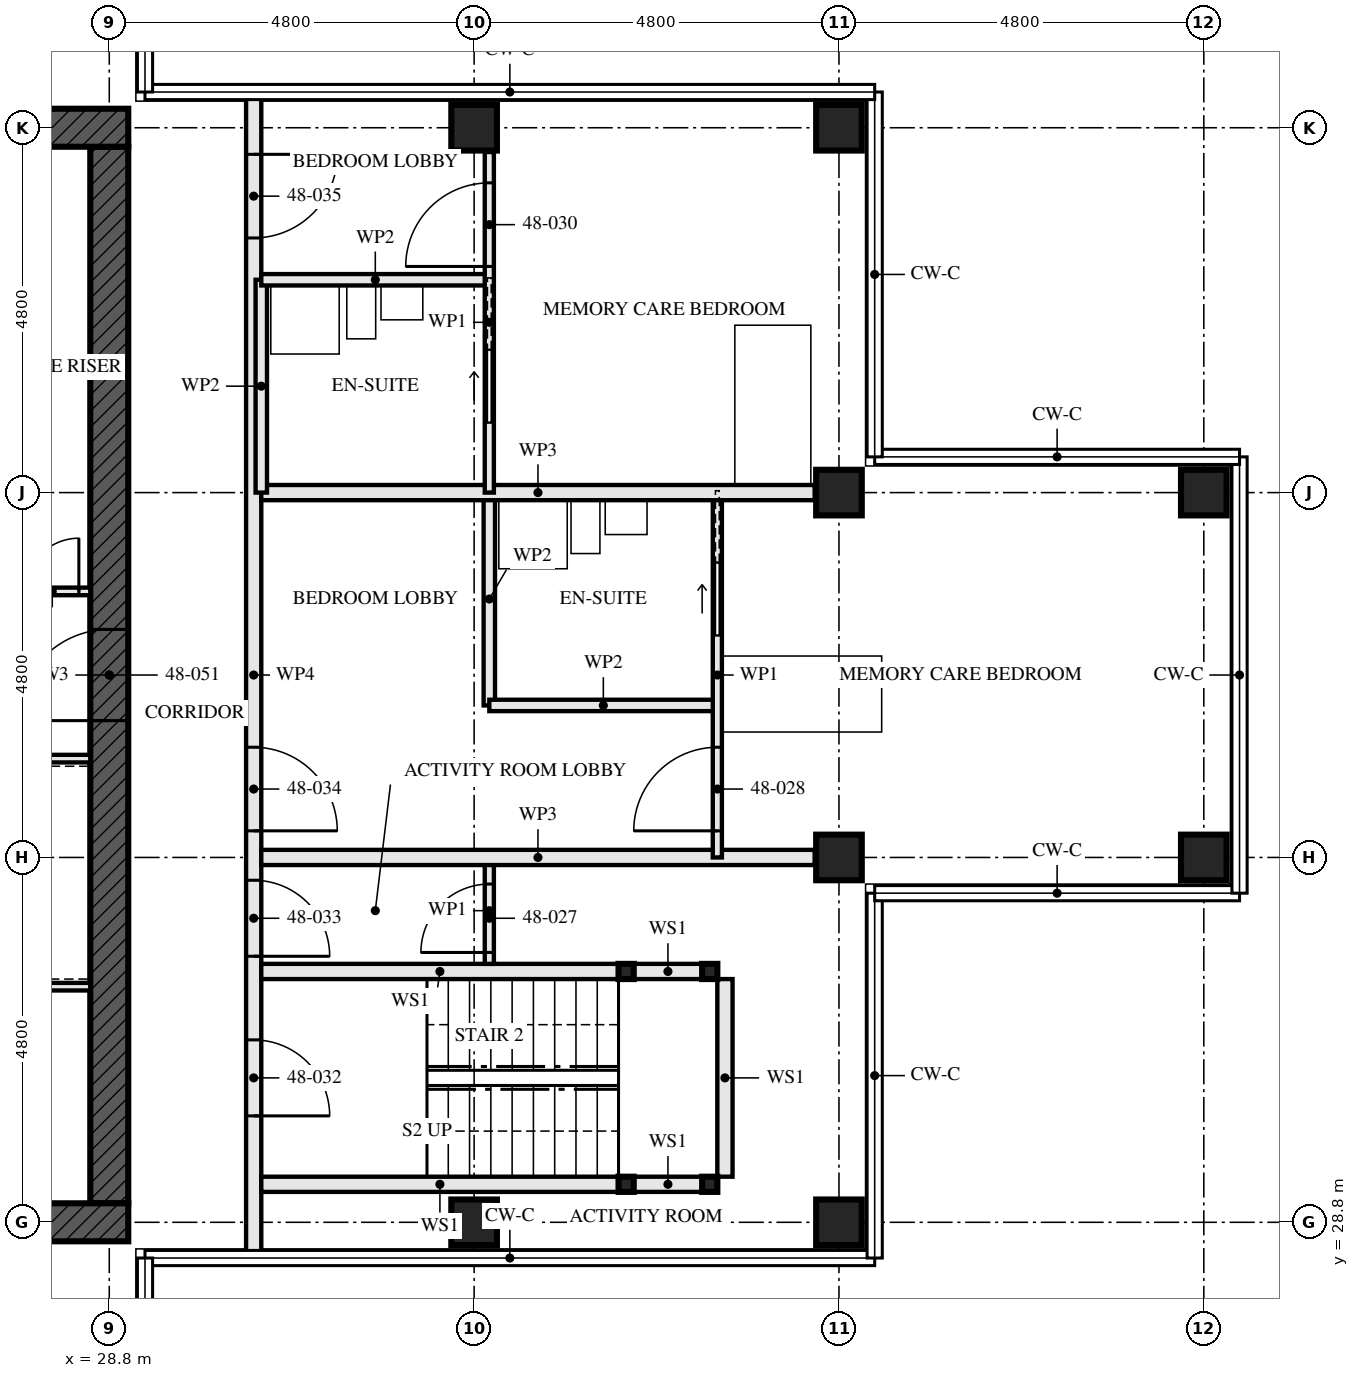
"""IFC4 building model, lengths in metres.
Left out: names, types, materials, properties, quantities, classifications, styles, units other than length and angle.
Written with IfcOpenShell. Run it as: python <this file> out.ifc"""

import sys

from ifc_helpers import new_model, si_unit, direction, frame, frame_2d, origin, origin_2d, place, context, subcontext, project, spatial, rectangle, hollow_rectangle, extrude, element, fill, save


model = new_model("IFC4")
c1 = context("Model", 3, precision=1e-05, world=origin(), true_north=direction((0.0, 1.0)))
c2 = subcontext(c1, "Body", "Model", "MODEL_VIEW")
j1 = project(units=[si_unit("LENGTHUNIT", "METRE"), si_unit("PLANEANGLEUNIT", "RADIAN")], contexts=[c1])
p1 = place(None, origin())
s1 = spatial("IfcSite", under=j1, at=p1, CompositionType="ELEMENT")
p2 = place(p1, origin())
s2 = spatial("IfcBuilding", under=s1, at=p2, CompositionType="ELEMENT")
p3 = place(p2, frame((0.0, 0.0, 176.0)))
s3 = spatial("IfcBuildingStorey", under=s2, at=p3, CompositionType="ELEMENT", Elevation=176.0)
for number, where, z_axis, x_axis in (
    (1, (33.6, 28.8, 0.0), (0.0, 0.0, 1.0), (0.0, 1.0, 0.0)),
    (2, (33.6, 43.2, 0.0), (0.0, 0.0, 1.0), (0.0, 1.0, 0.0)),
    (3, (38.4, 28.8, 0.0), (0.0, 0.0, 1.0), (0.0, 1.0, 0.0)),
    (4, (38.4, 33.6, 0.0), (0.0, 0.0, 1.0), (0.0, 1.0, 0.0)),
    (5, (38.4, 38.4, 0.0), (0.0, 0.0, 1.0), (0.0, 1.0, 0.0)),
    (6, (38.4, 43.2, 0.0), (0.0, 0.0, 1.0), (0.0, 1.0, 0.0)),
    (7, (43.2, 33.6, 0.0), (0.0, 0.0, 1.0), (0.0, 1.0, 0.0)),
    (8, (43.2, 38.4, 0.0), (0.0, 0.0, 1.0), (0.0, 1.0, 0.0)),
):
    element("IfcColumn", number, at=place(p3, frame(where, z_axis=z_axis, x_axis=x_axis)), inside=s3, PredefinedType="COLUMN", context=c2, shape_type="SweptSolid", body=[
        extrude(hollow_rectangle(XDim=0.6, YDim=0.6, WallThickness=0.08, at=origin_2d()), origin(), (0.0, 0.0, 1.0), 3.5),
    ])
p4 = place(p3, frame((14.15, 28.8, -0.17), z_axis=(0.0, 0.0, 1.0), x_axis=(1.0, 0.0, 0.0)))
e9 = element("IfcWall", 9, at=p4, inside=s3, PredefinedType="SHEAR", context=c2, shape_type="SweptSolid", body=[
    extrude(rectangle(XDim=14.9, YDim=0.5, at=frame_2d((7.45, 0.0))), origin(), (0.0, 0.0, 1.0), 3.5),
])
p5 = place(p4, frame((6.85, 0.0, 0.17)))
e10 = element("IfcOpeningElement", 10, at=p5, cuts=e9, PredefinedType="OPENING", context=c2, shape_type="SweptSolid", body=[
    extrude(rectangle(XDim=1.2, YDim=2.1, at=frame_2d((0.6, 1.05))), frame((0.0, 0.26, 0.0), z_axis=(0.0, -1.0, 0.0), x_axis=(1.0, 0.0, 0.0)), (0.0, 0.0, 1.0), 0.521),
])
p6 = place(p3, frame((29.05, 43.2, -0.17), z_axis=(0.0, 0.0, 1.0), x_axis=(-1.0, 0.0, 0.0)))
e11 = element("IfcWall", 11, at=p6, inside=s3, PredefinedType="SHEAR", context=c2, shape_type="SweptSolid", body=[
    extrude(rectangle(XDim=14.9, YDim=0.5, at=frame_2d((7.45, 0.0))), origin(), (0.0, 0.0, 1.0), 3.5),
])
p7 = place(p6, frame((6.85, 0.0, 0.17)))
e12 = element("IfcOpeningElement", 12, at=p7, cuts=e11, PredefinedType="OPENING", context=c2, shape_type="SweptSolid", body=[
    extrude(rectangle(XDim=1.2, YDim=2.1, at=frame_2d((0.6, 1.05))), frame((0.0, 0.26, 0.0), z_axis=(0.0, -1.0, 0.0), x_axis=(1.0, 0.0, 0.0)), (0.0, 0.0, 1.0), 0.521),
])
p8 = place(p3, frame((28.8, 29.05, -0.17), z_axis=(0.0, 0.0, 1.0), x_axis=(0.0, 1.0, 0.0)))
e13 = element("IfcWall", 13, at=p8, inside=s3, PredefinedType="SHEAR", context=c2, shape_type="SweptSolid", body=[
    extrude(rectangle(XDim=13.9, YDim=0.5, at=frame_2d((6.95, 0.0))), origin(), (0.0, 0.0, 1.0), 3.5),
])
p9 = place(p8, frame((6.35, 0.0, 0.17)))
e14 = element("IfcOpeningElement", 14, at=p9, cuts=e13, PredefinedType="OPENING", context=c2, shape_type="SweptSolid", body=[
    extrude(rectangle(XDim=1.2, YDim=2.1, at=frame_2d((0.6, 1.05))), frame((0.0, 0.26, 0.0), z_axis=(0.0, -1.0, 0.0), x_axis=(1.0, 0.0, 0.0)), (0.0, 0.0, 1.0), 0.521),
])
for number, where, z_axis, x_axis in (
    (15, (36.7, 29.3, 0.0), (0.0, 0.0, 1.0), (1.0, 0.0, 0.0)),
    (16, (36.7, 32.1, 0.0), (0.0, 0.0, 1.0), (1.0, 0.0, 0.0)),
    (17, (35.6, 29.3, 0.0), (0.0, 0.0, 1.0), (1.0, 0.0, 0.0)),
    (18, (35.6, 32.1, 0.0), (0.0, 0.0, 1.0), (1.0, 0.0, 0.0)),
):
    element("IfcColumn", number, at=place(p3, frame(where, z_axis=z_axis, x_axis=x_axis)), inside=s3, PredefinedType="COLUMN", context=c2, shape_type="SweptSolid", body=[
        extrude(hollow_rectangle(XDim=0.2, YDim=0.2, WallThickness=0.008, at=origin_2d()), origin(), (0.0, 0.0, 1.0), 3.33),
    ])
p10 = place(p3, frame((36.6, 29.3, 0.0), z_axis=(0.0, 0.0, 1.0), x_axis=(-1.0, 0.0, 0.0)))
e19 = element("IfcWall", 19, at=p10, inside=s3, PredefinedType="SOLIDWALL", context=c2, shape_type="SweptSolid", body=[
    extrude(rectangle(XDim=0.9, YDim=0.2, at=frame_2d((0.45, 0.0))), origin(), (0.0, 0.0, 1.0), 2.99),
])
p11 = place(p3, frame((35.5, 29.3, 0.0), z_axis=(0.0, 0.0, 1.0), x_axis=(-1.0, 0.0, 0.0)))
e20 = element("IfcWall", 20, at=p11, inside=s3, PredefinedType="SOLIDWALL", context=c2, shape_type="SweptSolid", body=[
    extrude(rectangle(XDim=4.7, YDim=0.2, at=frame_2d((2.35, 0.0))), origin(), (0.0, 0.0, 1.0), 2.99),
])
p12 = place(p3, frame((36.6, 32.1, 0.0), z_axis=(0.0, 0.0, 1.0), x_axis=(-1.0, 0.0, 0.0)))
e21 = element("IfcWall", 21, at=p12, inside=s3, PredefinedType="SOLIDWALL", context=c2, shape_type="SweptSolid", body=[
    extrude(rectangle(XDim=0.9, YDim=0.2, at=frame_2d((0.45, 0.0))), origin(), (0.0, 0.0, 1.0), 2.99),
])
p13 = place(p3, frame((35.5, 32.1, 0.0), z_axis=(0.0, 0.0, 1.0), x_axis=(-1.0, 0.0, 0.0)))
e22 = element("IfcWall", 22, at=p13, inside=s3, PredefinedType="SOLIDWALL", context=c2, shape_type="SweptSolid", body=[
    extrude(rectangle(XDim=4.7, YDim=0.2, at=frame_2d((2.35, 0.0))), origin(), (0.0, 0.0, 1.0), 2.99),
])
p14 = place(p3, frame((36.9, 29.4, 0.0), z_axis=(0.0, 0.0, 1.0), x_axis=(0.0, 1.0, 0.0)))
e23 = element("IfcWall", 23, at=p14, inside=s3, PredefinedType="SOLIDWALL", context=c2, shape_type="SweptSolid", body=[
    extrude(rectangle(XDim=2.6, YDim=0.2, at=frame_2d((1.3, 0.0))), origin(), (0.0, 0.0, 1.0), 3.33),
])
p15 = place(p3, frame((33.8, 32.2, 0.0), z_axis=(0.0, 0.0, 1.0), x_axis=(0.0, 1.0, 0.0)))
e24 = element("IfcWall", 24, at=p15, inside=s3, PredefinedType="PARTITIONING", context=c2, shape_type="SweptSolid", body=[
    extrude(rectangle(XDim=1.4, YDim=0.12, at=frame_2d((0.7, 0.0))), origin(), (0.0, 0.0, 1.0), 3.33),
])
p16 = place(p15, frame((0.15, 0.0, 0.0)))
e25 = element("IfcOpeningElement", 25, at=p16, cuts=e24, PredefinedType="OPENING", context=c2, shape_type="SweptSolid", body=[
    extrude(rectangle(XDim=0.9, YDim=2.1, at=frame_2d((0.45, 1.05))), frame((0.0, 0.071, 0.0), z_axis=(0.0, -1.0, 0.0), x_axis=(1.0, 0.0, 0.0)), (0.0, 0.0, 1.0), 0.141),
])
p17 = place(p3, frame((38.08, 33.6, 0.0), z_axis=(0.0, 0.0, 1.0), x_axis=(-1.0, 0.0, 0.0)))
e26 = element("IfcWall", 26, at=p17, inside=s3, PredefinedType="PARTITIONING", context=c2, shape_type="SweptSolid", body=[
    extrude(rectangle(XDim=7.28, YDim=0.2, at=frame_2d((3.64, 0.0))), origin(), (0.0, 0.0, 1.0), 2.55),
])
p18 = place(p3, frame((36.8, 35.6, 0.0), z_axis=(0.0, 0.0, 1.0), x_axis=(-1.0, 0.0, 0.0)))
e27 = element("IfcWall", 27, at=p18, inside=s3, PredefinedType="PARTITIONING", context=c2, shape_type="SweptSolid", body=[
    extrude(rectangle(XDim=3.0, YDim=0.15, at=frame_2d((1.5, 0.0))), origin(), (0.0, 0.0, 1.0), 3.33),
])
p19 = place(p3, frame((33.8, 35.6, 0.0), z_axis=(0.0, 0.0, 1.0), x_axis=(0.0, 1.0, 0.0)))
e28 = element("IfcWall", 28, at=p19, inside=s3, PredefinedType="PARTITIONING", context=c2, shape_type="SweptSolid", body=[
    extrude(rectangle(XDim=2.8, YDim=0.15, at=frame_2d((1.4, 0.0))), origin(), (0.0, 0.0, 1.0), 3.33),
])
p20 = place(p3, frame((36.8, 33.6, 0.0), z_axis=(0.0, 0.0, 1.0), x_axis=(0.0, 1.0, 0.0)))
e29 = element("IfcWall", 29, at=p20, inside=s3, PredefinedType="PARTITIONING", context=c2, shape_type="SweptSolid", body=[
    extrude(rectangle(XDim=4.8, YDim=0.12, at=frame_2d((2.4, 0.0))), origin(), (0.0, 0.0, 1.0), 3.33),
])
p21 = place(p20, frame((0.35, 0.0, 0.0)))
e30 = element("IfcOpeningElement", 30, at=p21, cuts=e29, PredefinedType="OPENING", context=c2, shape_type="SweptSolid", body=[
    extrude(rectangle(XDim=1.1, YDim=2.1, at=frame_2d((0.55, 1.05))), frame((0.0, 0.071, 0.0), z_axis=(0.0, -1.0, 0.0), x_axis=(1.0, 0.0, 0.0)), (0.0, 0.0, 1.0), 0.141),
])
p22 = place(p20, frame((2.925, 0.0, 0.0)))
e31 = element("IfcOpeningElement", 31, at=p22, cuts=e29, PredefinedType="OPENING", context=c2, shape_type="SweptSolid", body=[
    extrude(rectangle(XDim=0.95, YDim=2.1, at=frame_2d((0.475, 1.05))), frame((0.0, 0.071, 0.0), z_axis=(0.0, -1.0, 0.0), x_axis=(1.0, 0.0, 0.0)), (0.0, 0.0, 1.0), 0.141),
])
p23 = place(p3, frame((38.08, 38.4, 0.0), z_axis=(0.0, 0.0, 1.0), x_axis=(-1.0, 0.0, 0.0)))
e32 = element("IfcWall", 32, at=p23, inside=s3, PredefinedType="PARTITIONING", context=c2, shape_type="SweptSolid", body=[
    extrude(rectangle(XDim=7.28, YDim=0.2, at=frame_2d((3.64, 0.0))), origin(), (0.0, 0.0, 1.0), 2.55),
])
p24 = place(p3, frame((33.8, 41.2, 0.0), z_axis=(0.0, 0.0, 1.0), x_axis=(-1.0, 0.0, 0.0)))
e33 = element("IfcWall", 33, at=p24, inside=s3, PredefinedType="PARTITIONING", context=c2, shape_type="SweptSolid", body=[
    extrude(rectangle(XDim=3.0, YDim=0.15, at=frame_2d((1.5, 0.0))), origin(), (0.0, 0.0, 1.0), 3.33),
])
p25 = place(p3, frame((30.8, 38.4, 0.0), z_axis=(0.0, 0.0, 1.0), x_axis=(0.0, 1.0, 0.0)))
e34 = element("IfcWall", 34, at=p25, inside=s3, PredefinedType="PARTITIONING", context=c2, shape_type="SweptSolid", body=[
    extrude(rectangle(XDim=2.8, YDim=0.15, at=frame_2d((1.4, 0.0))), origin(), (0.0, 0.0, 1.0), 3.33),
])
p26 = place(p3, frame((33.8, 38.4, 0.0), z_axis=(0.0, 0.0, 1.0), x_axis=(0.0, 1.0, 0.0)))
e35 = element("IfcWall", 35, at=p26, inside=s3, PredefinedType="PARTITIONING", context=c2, shape_type="SweptSolid", body=[
    extrude(rectangle(XDim=4.48, YDim=0.12, at=frame_2d((2.24, 0.0))), origin(), (0.0, 0.0, 1.0), 3.33),
])
p27 = place(p26, frame((2.975, 0.0, 0.0)))
e36 = element("IfcOpeningElement", 36, at=p27, cuts=e35, PredefinedType="OPENING", context=c2, shape_type="SweptSolid", body=[
    extrude(rectangle(XDim=1.1, YDim=2.1, at=frame_2d((0.55, 1.05))), frame((0.0, 0.071, 0.0), z_axis=(0.0, -1.0, 0.0), x_axis=(1.0, 0.0, 0.0)), (0.0, 0.0, 1.0), 0.141),
])
p28 = place(p26, frame((0.925, 0.0, 0.0)))
e37 = element("IfcOpeningElement", 37, at=p28, cuts=e35, PredefinedType="OPENING", context=c2, shape_type="SweptSolid", body=[
    extrude(rectangle(XDim=0.95, YDim=2.1, at=frame_2d((0.475, 1.05))), frame((0.0, 0.071, 0.0), z_axis=(0.0, -1.0, 0.0), x_axis=(1.0, 0.0, 0.0)), (0.0, 0.0, 1.0), 0.141),
])
p29 = place(p3, frame((30.7, 28.35, 0.0), z_axis=(0.0, 0.0, 1.0), x_axis=(0.0, 1.0, 0.0)))
e38 = element("IfcWall", 38, at=p29, inside=s3, PredefinedType="PARTITIONING", context=c2, shape_type="SweptSolid", body=[
    extrude(rectangle(XDim=15.3, YDim=0.2, at=frame_2d((7.65, 0.0))), origin(), (0.0, 0.0, 1.0), 2.32),
])
p30 = place(p29, frame((1.85, 0.0, 0.0)))
e39 = element("IfcOpeningElement", 39, at=p30, cuts=e38, PredefinedType="OPENING", context=c2, shape_type="SweptSolid", body=[
    extrude(rectangle(XDim=1.0, YDim=2.1, at=frame_2d((0.5, 1.05))), frame((0.0, 0.111, 0.0), z_axis=(0.0, -1.0, 0.0), x_axis=(1.0, 0.0, 0.0)), (0.0, 0.0, 1.0), 0.221),
])
p31 = place(p29, frame((3.95, 0.0, 0.0)))
e40 = element("IfcOpeningElement", 40, at=p31, cuts=e38, PredefinedType="OPENING", context=c2, shape_type="SweptSolid", body=[
    extrude(rectangle(XDim=1.0, YDim=2.1, at=frame_2d((0.5, 1.05))), frame((0.0, 0.111, 0.0), z_axis=(0.0, -1.0, 0.0), x_axis=(1.0, 0.0, 0.0)), (0.0, 0.0, 1.0), 0.221),
])
p32 = place(p29, frame((5.6, 0.0, 0.0)))
e41 = element("IfcOpeningElement", 41, at=p32, cuts=e38, PredefinedType="OPENING", context=c2, shape_type="SweptSolid", body=[
    extrude(rectangle(XDim=1.1, YDim=2.1, at=frame_2d((0.55, 1.05))), frame((0.0, 0.111, 0.0), z_axis=(0.0, -1.0, 0.0), x_axis=(1.0, 0.0, 0.0)), (0.0, 0.0, 1.0), 0.221),
])
p33 = place(p29, frame((13.4, 0.0, 0.0)))
e42 = element("IfcOpeningElement", 42, at=p33, cuts=e38, PredefinedType="OPENING", context=c2, shape_type="SweptSolid", body=[
    extrude(rectangle(XDim=1.1, YDim=2.1, at=frame_2d((0.55, 1.05))), frame((0.0, 0.111, 0.0), z_axis=(0.0, -1.0, 0.0), x_axis=(1.0, 0.0, 0.0)), (0.0, 0.0, 1.0), 0.221),
])
p34 = place(p3, frame((23.05, 34.9, 0.0), z_axis=(0.0, 0.0, 1.0), x_axis=(1.0, 0.0, 0.0)))
e43 = element("IfcWall", 43, at=p34, inside=s3, PredefinedType="SOLIDWALL", context=c2, shape_type="SweptSolid", body=[
    extrude(rectangle(XDim=5.5, YDim=0.1, at=frame_2d((2.75, 0.0))), origin(), (0.0, 0.0, 1.0), 3.33),
])
p35 = place(p34, frame((0.85, 0.0, 0.0)))
e44 = element("IfcOpeningElement", 44, at=p35, cuts=e43, PredefinedType="OPENING", context=c2, shape_type="SweptSolid", body=[
    extrude(rectangle(XDim=1.0, YDim=2.1, at=frame_2d((0.5, 1.05))), frame((0.0, 0.061, 0.0), z_axis=(0.0, -1.0, 0.0), x_axis=(1.0, 0.0, 0.0)), (0.0, 0.0, 1.0), 0.121),
])
p36 = place(p34, frame((3.625, 0.0, 0.0)))
e45 = element("IfcOpeningElement", 45, at=p36, cuts=e43, PredefinedType="OPENING", context=c2, shape_type="SweptSolid", body=[
    extrude(rectangle(XDim=1.0, YDim=2.1, at=frame_2d((0.5, 1.05))), frame((0.0, 0.061, 0.0), z_axis=(0.0, -1.0, 0.0), x_axis=(1.0, 0.0, 0.0)), (0.0, 0.0, 1.0), 0.121),
])
p37 = place(p3, frame((22.65, 37.1, 0.0), z_axis=(0.0, 0.0, 1.0), x_axis=(1.0, 0.0, 0.0)))
e46 = element("IfcWall", 46, at=p37, inside=s3, PredefinedType="SOLIDWALL", context=c2, shape_type="SweptSolid", body=[
    extrude(rectangle(XDim=5.9, YDim=0.1, at=frame_2d((2.95, 0.0))), origin(), (0.0, 0.0, 1.0), 3.33),
])
p38 = place(p37, frame((3.5, 0.0, 0.0)))
e47 = element("IfcOpeningElement", 47, at=p38, cuts=e46, PredefinedType="OPENING", context=c2, shape_type="SweptSolid", body=[
    extrude(rectangle(XDim=0.9, YDim=2.1, at=frame_2d((0.45, 1.05))), frame((0.0, 0.061, 0.0), z_axis=(0.0, -1.0, 0.0), x_axis=(1.0, 0.0, 0.0)), (0.0, 0.0, 1.0), 0.121),
])
p39 = place(p37, frame((5.05, 0.0, 0.0)))
e48 = element("IfcOpeningElement", 48, at=p39, cuts=e46, PredefinedType="OPENING", context=c2, shape_type="SweptSolid", body=[
    extrude(rectangle(XDim=0.7, YDim=2.1, at=frame_2d((0.35, 1.05))), frame((0.0, 0.061, 0.0), z_axis=(0.0, -1.0, 0.0), x_axis=(1.0, 0.0, 0.0)), (0.0, 0.0, 1.0), 0.121),
])
p40 = place(p3, frame((23.15, 31.9, 0.0), z_axis=(0.0, 0.0, 1.0), x_axis=(1.0, 0.0, 0.0)))
e49 = element("IfcWall", 49, at=p40, inside=s3, PredefinedType="SOLIDWALL", context=c2, shape_type="SweptSolid", body=[
    extrude(rectangle(XDim=5.4, YDim=0.1, at=frame_2d((2.7, 0.0))), origin(), (0.0, 0.0, 1.0), 3.33),
])
p41 = place(p16, origin())
e50 = element("IfcDoor", 50, at=p41, inside=s3, OperationType="SINGLE_SWING_RIGHT", PredefinedType="DOOR", context=c2, shape_type="SweptSolid", body=[
    extrude(rectangle(XDim=0.9, YDim=2.1, at=frame_2d((0.45, 1.05))), frame((0.0, 0.022, 0.0), z_axis=(0.0, -1.0, 0.0), x_axis=(1.0, 0.0, 0.0)), (0.0, 0.0, 1.0), 0.044),
])
fill(e25, e50)
p42 = place(p21, origin())
e51 = element("IfcDoor", 51, at=p42, inside=s3, OperationType="SINGLE_SWING_RIGHT", PredefinedType="DOOR", context=c2, shape_type="SweptSolid", body=[
    extrude(rectangle(XDim=1.1, YDim=2.1, at=frame_2d((0.55, 1.05))), frame((0.0, 0.022, 0.0), z_axis=(0.0, -1.0, 0.0), x_axis=(1.0, 0.0, 0.0)), (0.0, 0.0, 1.0), 0.044),
])
fill(e30, e51)
p43 = place(p22, origin())
e52 = element("IfcDoor", 52, at=p43, inside=s3, OperationType="SLIDING_TO_LEFT", PredefinedType="DOOR", context=c2, shape_type="SweptSolid", body=[
    extrude(rectangle(XDim=0.95, YDim=2.1, at=frame_2d((0.475, 1.05))), frame((0.0, 0.022, 0.0), z_axis=(0.0, -1.0, 0.0), x_axis=(1.0, 0.0, 0.0)), (0.0, 0.0, 1.0), 0.044),
])
fill(e31, e52)
p44 = place(p27, origin())
e53 = element("IfcDoor", 53, at=p44, inside=s3, OperationType="SINGLE_SWING_RIGHT", PredefinedType="DOOR", context=c2, shape_type="SweptSolid", body=[
    extrude(rectangle(XDim=1.1, YDim=2.1, at=frame_2d((0.55, 1.05))), frame((0.0, 0.022, 0.0), z_axis=(0.0, -1.0, 0.0), x_axis=(1.0, 0.0, 0.0)), (0.0, 0.0, 1.0), 0.044),
])
fill(e36, e53)
p45 = place(p28, origin())
e54 = element("IfcDoor", 54, at=p45, inside=s3, OperationType="SLIDING_TO_LEFT", PredefinedType="DOOR", context=c2, shape_type="SweptSolid", body=[
    extrude(rectangle(XDim=0.95, YDim=2.1, at=frame_2d((0.475, 1.05))), frame((0.0, 0.022, 0.0), z_axis=(0.0, -1.0, 0.0), x_axis=(1.0, 0.0, 0.0)), (0.0, 0.0, 1.0), 0.044),
])
fill(e37, e54)
p46 = place(p30, frame((1.0, 0.0, 0.0), z_axis=(0.0, 0.0, 1.0), x_axis=(-1.0, 0.0, 0.0)))
e55 = element("IfcDoor", 55, at=p46, inside=s3, OperationType="SINGLE_SWING_LEFT", PredefinedType="DOOR", context=c2, shape_type="SweptSolid", body=[
    extrude(rectangle(XDim=1.0, YDim=2.1, at=frame_2d((0.5, 1.05))), frame((0.0, 0.032, 0.0), z_axis=(0.0, -1.0, 0.0), x_axis=(1.0, 0.0, 0.0)), (0.0, 0.0, 1.0), 0.064),
])
fill(e39, e55)
p47 = place(p31, frame((1.0, 0.0, 0.0), z_axis=(0.0, 0.0, 1.0), x_axis=(-1.0, 0.0, 0.0)))
e56 = element("IfcDoor", 56, at=p47, inside=s3, OperationType="SINGLE_SWING_LEFT", PredefinedType="DOOR", context=c2, shape_type="SweptSolid", body=[
    extrude(rectangle(XDim=1.0, YDim=2.1, at=frame_2d((0.5, 1.05))), frame((0.0, 0.027, 0.0), z_axis=(0.0, -1.0, 0.0), x_axis=(1.0, 0.0, 0.0)), (0.0, 0.0, 1.0), 0.054),
])
fill(e40, e56)
p48 = place(p32, frame((1.1, 0.0, 0.0), z_axis=(0.0, 0.0, 1.0), x_axis=(-1.0, 0.0, 0.0)))
e57 = element("IfcDoor", 57, at=p48, inside=s3, OperationType="SINGLE_SWING_LEFT", PredefinedType="DOOR", context=c2, shape_type="SweptSolid", body=[
    extrude(rectangle(XDim=1.1, YDim=2.1, at=frame_2d((0.55, 1.05))), frame((0.0, 0.027, 0.0), z_axis=(0.0, -1.0, 0.0), x_axis=(1.0, 0.0, 0.0)), (0.0, 0.0, 1.0), 0.054),
])
fill(e41, e57)
p49 = place(p33, frame((1.1, 0.0, 0.0), z_axis=(0.0, 0.0, 1.0), x_axis=(-1.0, 0.0, 0.0)))
e58 = element("IfcDoor", 58, at=p49, inside=s3, OperationType="SINGLE_SWING_RIGHT", PredefinedType="DOOR", context=c2, shape_type="SweptSolid", body=[
    extrude(rectangle(XDim=1.1, YDim=2.1, at=frame_2d((0.55, 1.05))), frame((0.0, 0.027, 0.0), z_axis=(0.0, -1.0, 0.0), x_axis=(1.0, 0.0, 0.0)), (0.0, 0.0, 1.0), 0.054),
])
fill(e42, e58)
p50 = place(p39, origin())
e59 = element("IfcDoor", 59, at=p50, inside=s3, OperationType="SINGLE_SWING_LEFT", PredefinedType="DOOR", context=c2, shape_type="SweptSolid", body=[
    extrude(rectangle(XDim=0.7, YDim=2.1, at=frame_2d((0.35, 1.05))), frame((0.0, 0.027, 0.0), z_axis=(0.0, -1.0, 0.0), x_axis=(1.0, 0.0, 0.0)), (0.0, 0.0, 1.0), 0.054),
])
fill(e48, e59)
p51 = place(p9, origin())
e60 = element("IfcDoor", 60, at=p51, inside=s3, OperationType="SINGLE_SWING_LEFT", PredefinedType="DOOR", context=c2, shape_type="SweptSolid", body=[
    extrude(rectangle(XDim=1.2, YDim=2.1, at=frame_2d((0.6, 1.05))), frame((0.0, 0.027, 0.0), z_axis=(0.0, -1.0, 0.0), x_axis=(1.0, 0.0, 0.0)), (0.0, 0.0, 1.0), 0.054),
])
fill(e14, e60)
save(model, sys.argv[1])
